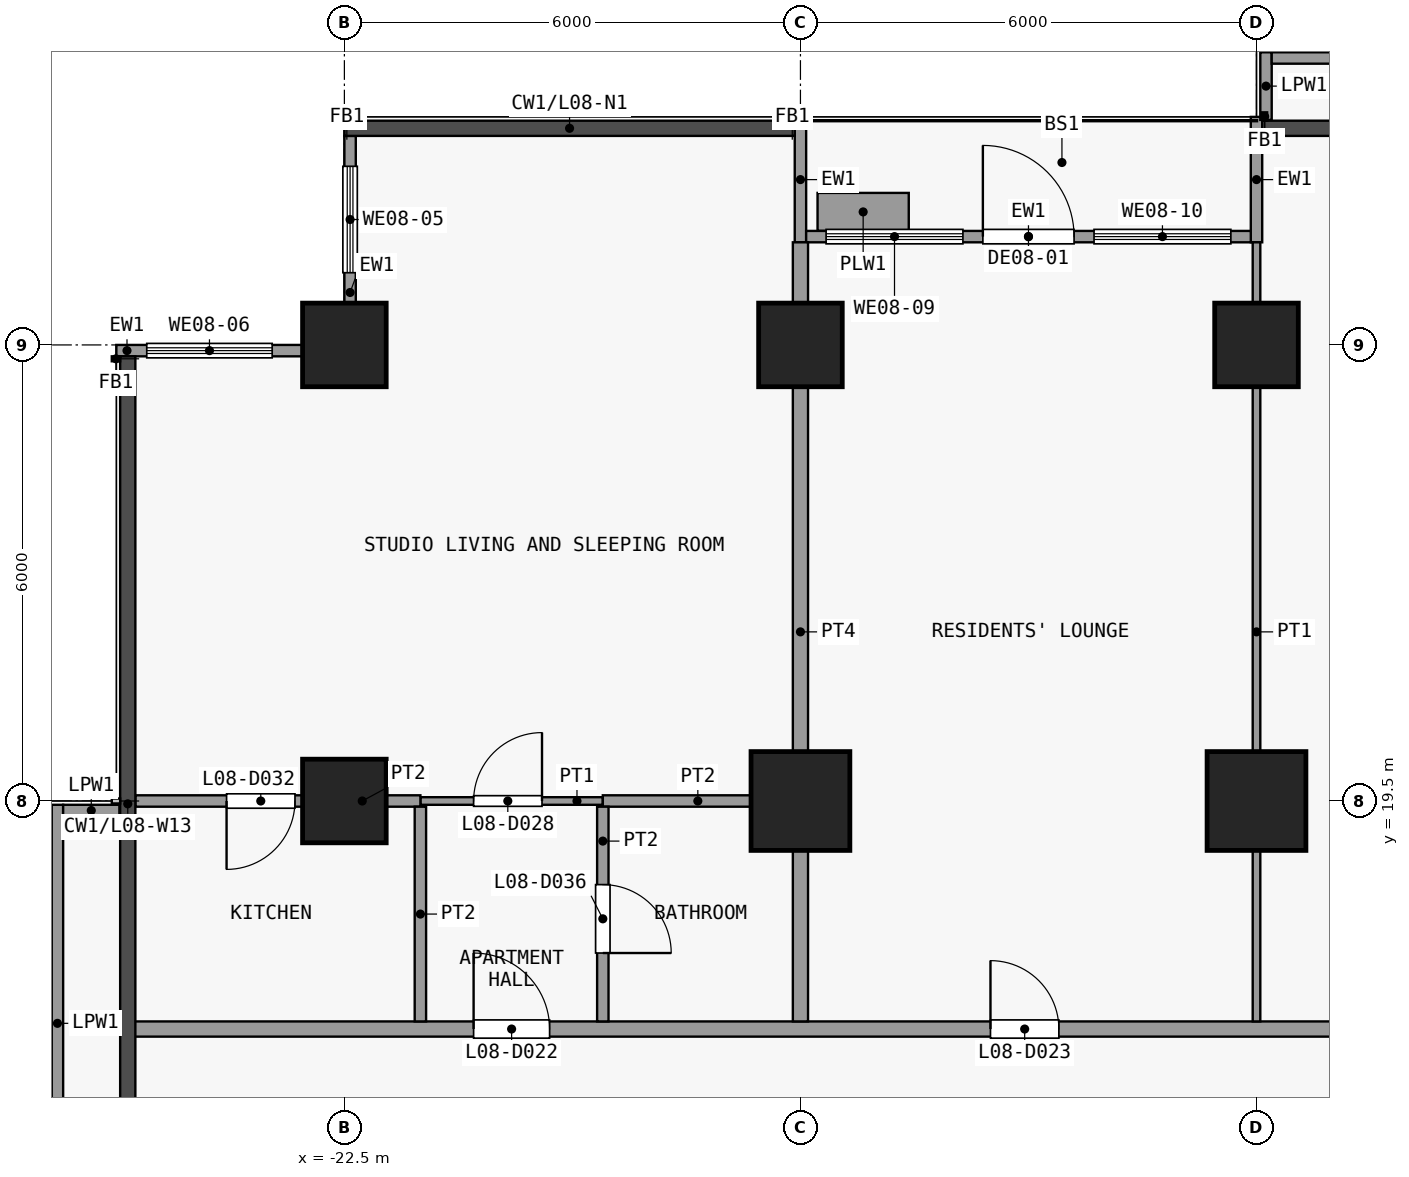
"""IFC4 building model, lengths in metres.
Left out: names, types, materials, properties, quantities, classifications, styles, units other than length and angle.
Written with IfcOpenShell. Run it as: python <this file> out.ifc"""

import sys

from ifc_helpers import new_model, si_unit, direction, frame, frame_2d, origin, origin_2d, place, context, subcontext, project, spatial, rectangle, extrude, element, fill, save


model = new_model("IFC4")
c1 = context("Model", 3, precision=1e-05, world=origin(), true_north=direction((0.0, 1.0)))
c2 = subcontext(c1, "Body", "Model", "MODEL_VIEW")
j1 = project(units=[si_unit("LENGTHUNIT", "METRE"), si_unit("PLANEANGLEUNIT", "RADIAN")], contexts=[c1])
p1 = place(None, origin())
s1 = spatial("IfcSite", under=j1, at=p1, CompositionType="ELEMENT")
p2 = place(p1, origin())
s2 = spatial("IfcBuilding", under=s1, at=p2, CompositionType="ELEMENT")
p3 = place(p2, frame((0.0, 0.0, 39.7)))
s3 = spatial("IfcBuildingStorey", under=s2, at=p3, CompositionType="ELEMENT", Elevation=39.7)
for number, where, z_axis, x_axis in (
    (1, (-22.5, 19.5, 0.0), (0.0, 0.0, 1.0), (1.0, 0.0, 0.0)),
    (2, (-22.5, 25.5, 0.0), (0.0, 0.0, 1.0), (1.0, 0.0, 0.0)),
):
    element("IfcColumn", number, at=place(p3, frame(where, z_axis=z_axis, x_axis=x_axis)), inside=s3, PredefinedType="COLUMN", context=c2, shape_type="SweptSolid", body=[
        extrude(rectangle(XDim=1.1, YDim=1.1, at=origin_2d()), origin(), (0.0, 0.0, 1.0), 3.6),
    ])
p4 = place(p3, frame((-16.5, 19.5, 0.0), z_axis=(0.0, 0.0, 1.0), x_axis=(1.0, 0.0, 0.0)))
e3 = element("IfcColumn", 3, at=p4, inside=s3, PredefinedType="COLUMN", context=c2, shape_type="SweptSolid", body=[
    extrude(rectangle(XDim=1.3, YDim=1.3, at=origin_2d()), origin(), (0.0, 0.0, 1.0), 3.6),
])
p5 = place(p3, frame((-16.5, 25.5, 0.0), z_axis=(0.0, 0.0, 1.0), x_axis=(1.0, 0.0, 0.0)))
e4 = element("IfcColumn", 4, at=p5, inside=s3, PredefinedType="COLUMN", context=c2, shape_type="SweptSolid", body=[
    extrude(rectangle(XDim=1.1, YDim=1.1, at=origin_2d()), origin(), (0.0, 0.0, 1.0), 3.6),
])
p6 = place(p3, frame((-10.5, 19.5, 0.0), z_axis=(0.0, 0.0, 1.0), x_axis=(1.0, 0.0, 0.0)))
e5 = element("IfcColumn", 5, at=p6, inside=s3, PredefinedType="COLUMN", context=c2, shape_type="SweptSolid", body=[
    extrude(rectangle(XDim=1.3, YDim=1.3, at=origin_2d()), origin(), (0.0, 0.0, 1.0), 3.6),
])
p7 = place(p3, frame((-10.5, 25.5, 0.0), z_axis=(0.0, 0.0, 1.0), x_axis=(1.0, 0.0, 0.0)))
e6 = element("IfcColumn", 6, at=p7, inside=s3, PredefinedType="COLUMN", context=c2, shape_type="SweptSolid", body=[
    extrude(rectangle(XDim=1.1, YDim=1.1, at=origin_2d()), origin(), (0.0, 0.0, 1.0), 3.6),
])
p8 = place(p3, frame((-22.425, 26.05, 0.0), z_axis=(0.0, 0.0, 1.0), x_axis=(0.0, 1.0, 0.0)))
e7 = element("IfcWall", 7, at=p8, inside=s3, PredefinedType="SOLIDWALL", context=c2, shape_type="SweptSolid", body=[
    extrude(rectangle(XDim=2.2, YDim=0.15, at=frame_2d((1.1, 0.0))), origin(), (0.0, 0.0, 1.0), 3.3),
])
p9 = place(p8, frame((0.4, 0.0, 0.9)))
e8 = element("IfcOpeningElement", 8, at=p9, cuts=e7, PredefinedType="OPENING", context=c2, shape_type="SweptSolid", body=[
    extrude(rectangle(XDim=1.4, YDim=2.4, at=frame_2d((0.7, 1.2))), frame((0.0, 0.085, 0.0), z_axis=(0.0, -1.0, 0.0), x_axis=(1.0, 0.0, 0.0)), (0.0, 0.0, 1.0), 0.17),
])
p10 = place(p3, frame((-25.5, 25.425, 0.0), z_axis=(0.0, 0.0, 1.0), x_axis=(1.0, 0.0, 0.0)))
e9 = element("IfcWall", 9, at=p10, inside=s3, PredefinedType="SOLIDWALL", context=c2, shape_type="SweptSolid", body=[
    extrude(rectangle(XDim=2.45, YDim=0.15, at=frame_2d((1.225, 0.0))), origin(), (0.0, 0.0, 1.0), 3.3),
])
p11 = place(p10, frame((0.4, 0.0, 0.9)))
e10 = element("IfcOpeningElement", 10, at=p11, cuts=e9, PredefinedType="OPENING", context=c2, shape_type="SweptSolid", body=[
    extrude(rectangle(XDim=1.65, YDim=2.4, at=frame_2d((0.825, 1.2))), frame((0.0, 0.085, 0.0), z_axis=(0.0, -1.0, 0.0), x_axis=(1.0, 0.0, 0.0)), (0.0, 0.0, 1.0), 0.17),
])
for number, where, z_axis, x_axis in (
    (11, (-16.5, 26.85, 0.0), (0.0, 0.0, 1.0), (0.0, 1.0, 0.0)),
    (12, (-10.5, 26.85, 0.0), (0.0, 0.0, 1.0), (0.0, 1.0, 0.0)),
):
    element("IfcWall", number, at=place(p3, frame(where, z_axis=z_axis, x_axis=x_axis)), inside=s3, PredefinedType="SOLIDWALL", context=c2, shape_type="SweptSolid", body=[
        extrude(rectangle(XDim=1.65, YDim=0.15, at=frame_2d((0.825, 0.0))), origin(), (0.0, 0.0, 1.0), 3.3),
    ])
p12 = place(p3, frame((-16.425, 26.925, 0.0), z_axis=(0.0, 0.0, 1.0), x_axis=(1.0, 0.0, 0.0)))
e13 = element("IfcWall", 13, at=p12, inside=s3, PredefinedType="SOLIDWALL", context=c2, shape_type="SweptSolid", body=[
    extrude(rectangle(XDim=5.85, YDim=0.15, at=frame_2d((2.925, 0.0))), origin(), (0.0, 0.0, 1.0), 3.3),
])
p13 = place(p12, frame((2.325, 0.0, 0.0)))
e14 = element("IfcOpeningElement", 14, at=p13, cuts=e13, PredefinedType="OPENING", context=c2, shape_type="SweptSolid", body=[
    extrude(rectangle(XDim=1.2, YDim=2.4, at=frame_2d((0.6, 1.2))), frame((0.0, 0.085, 0.0), z_axis=(0.0, -1.0, 0.0), x_axis=(1.0, 0.0, 0.0)), (0.0, 0.0, 1.0), 0.17),
])
p14 = place(p12, frame((0.262, 0.0, 0.9)))
e15 = element("IfcOpeningElement", 15, at=p14, cuts=e13, PredefinedType="OPENING", context=c2, shape_type="SweptSolid", body=[
    extrude(rectangle(XDim=1.8, YDim=2.1, at=frame_2d((0.9, 1.05))), frame((0.0, 0.085, 0.0), z_axis=(0.0, -1.0, 0.0), x_axis=(1.0, 0.0, 0.0)), (0.0, 0.0, 1.0), 0.17),
])
p15 = place(p12, frame((3.788, 0.0, 0.9)))
e16 = element("IfcOpeningElement", 16, at=p15, cuts=e13, PredefinedType="OPENING", context=c2, shape_type="SweptSolid", body=[
    extrude(rectangle(XDim=1.8, YDim=2.1, at=frame_2d((0.9, 1.05))), frame((0.0, 0.085, 0.0), z_axis=(0.0, -1.0, 0.0), x_axis=(1.0, 0.0, 0.0)), (0.0, 0.0, 1.0), 0.17),
])
p16 = place(p3, frame((-16.275, 27.25, 0.0), z_axis=(0.0, 0.0, 1.0), x_axis=(1.0, 0.0, 0.0)))
e17 = element("IfcWall", 17, at=p16, inside=s3, PredefinedType="USERDEFINED", context=c2, shape_type="SweptSolid", body=[
    extrude(rectangle(XDim=1.2, YDim=0.5, at=frame_2d((0.6, 0.0))), origin(), (0.0, 0.0, 1.0), 0.9),
])
p17 = place(p3, frame((-26.275, 13.7, 0.0), z_axis=(0.0, 0.0, 1.0), x_axis=(0.0, 1.0, 0.0)))
e18 = element("IfcWall", 18, at=p17, inside=s3, PredefinedType="PARAPET", context=c2, shape_type="SweptSolid", body=[
    extrude(rectangle(XDim=5.75, YDim=0.15, at=frame_2d((2.875, 0.0))), origin(), (0.0, 0.0, 1.0), 1.15),
])
p18 = place(p3, frame((-26.2, 19.375, 0.0), z_axis=(0.0, 0.0, 1.0), x_axis=(1.0, 0.0, 0.0)))
e19 = element("IfcWall", 19, at=p18, inside=s3, PredefinedType="PARAPET", context=c2, shape_type="SweptSolid", body=[
    extrude(rectangle(XDim=0.74, YDim=0.15, at=frame_2d((0.37, 0.0))), origin(), (0.0, 0.0, 1.0), 1.15),
])
p19 = place(p3, frame((-10.375, 28.46, 0.0), z_axis=(0.0, 0.0, 1.0), x_axis=(0.0, 1.0, 0.0)))
e20 = element("IfcWall", 20, at=p19, inside=s3, PredefinedType="PARAPET", context=c2, shape_type="SweptSolid", body=[
    extrude(rectangle(XDim=0.89, YDim=0.15, at=frame_2d((0.445, 0.0))), origin(), (0.0, 0.0, 1.0), 1.15),
])
p20 = place(p3, frame((-10.3, 29.275, 0.0), z_axis=(0.0, 0.0, 1.0), x_axis=(1.0, 0.0, 0.0)))
e21 = element("IfcWall", 21, at=p20, inside=s3, PredefinedType="PARAPET", context=c2, shape_type="SweptSolid", body=[
    extrude(rectangle(XDim=5.84, YDim=0.15, at=frame_2d((2.92, 0.0))), origin(), (0.0, 0.0, 1.0), 1.15),
])
p21 = place(p3, frame((-25.35, 16.5, 0.0), z_axis=(0.0, 0.0, 1.0), x_axis=(1.0, 0.0, 0.0)))
e22 = element("IfcWall", 22, at=p21, inside=s3, PredefinedType="PARTITIONING", context=c2, shape_type="SweptSolid", body=[
    extrude(rectangle(XDim=50.7, YDim=0.2, at=frame_2d((25.35, 0.0))), origin(), (0.0, 0.0, 1.0), 3.3),
])
p22 = place(p21, frame((4.55, 0.0, 0.0)))
e23 = element("IfcOpeningElement", 23, at=p22, cuts=e22, PredefinedType="OPENING", context=c2, shape_type="SweptSolid", body=[
    extrude(rectangle(XDim=1.0, YDim=2.1, at=frame_2d((0.5, 1.05))), frame((0.0, 0.11, 0.0), z_axis=(0.0, -1.0, 0.0), x_axis=(1.0, 0.0, 0.0)), (0.0, 0.0, 1.0), 0.22),
])
p23 = place(p21, frame((11.35, 0.0, 0.0)))
e24 = element("IfcOpeningElement", 24, at=p23, cuts=e22, PredefinedType="OPENING", context=c2, shape_type="SweptSolid", body=[
    extrude(rectangle(XDim=0.9, YDim=2.1, at=frame_2d((0.45, 1.05))), frame((0.0, 0.11, 0.0), z_axis=(0.0, -1.0, 0.0), x_axis=(1.0, 0.0, 0.0)), (0.0, 0.0, 1.0), 0.22),
])
p24 = place(p21, frame((17.35, 0.0, 0.0)))
e25 = element("IfcOpeningElement", 25, at=p24, cuts=e22, PredefinedType="OPENING", context=c2, shape_type="SweptSolid", body=[
    extrude(rectangle(XDim=0.9, YDim=2.1, at=frame_2d((0.45, 1.05))), frame((0.0, 0.11, 0.0), z_axis=(0.0, -1.0, 0.0), x_axis=(1.0, 0.0, 0.0)), (0.0, 0.0, 1.0), 0.22),
])
p25 = place(p21, frame((24.05, 0.0, 0.0)))
e26 = element("IfcOpeningElement", 26, at=p25, cuts=e22, PredefinedType="OPENING", context=c2, shape_type="SweptSolid", body=[
    extrude(rectangle(XDim=1.0, YDim=2.1, at=frame_2d((0.5, 1.05))), frame((0.0, 0.11, 0.0), z_axis=(0.0, -1.0, 0.0), x_axis=(1.0, 0.0, 0.0)), (0.0, 0.0, 1.0), 0.22),
])
p26 = place(p21, frame((30.55, 0.0, 0.0)))
e27 = element("IfcOpeningElement", 27, at=p26, cuts=e22, PredefinedType="OPENING", context=c2, shape_type="SweptSolid", body=[
    extrude(rectangle(XDim=1.0, YDim=2.1, at=frame_2d((0.5, 1.05))), frame((0.0, 0.11, 0.0), z_axis=(0.0, -1.0, 0.0), x_axis=(1.0, 0.0, 0.0)), (0.0, 0.0, 1.0), 0.22),
])
p27 = place(p21, frame((42.55, 0.0, 0.0)))
e28 = element("IfcOpeningElement", 28, at=p27, cuts=e22, PredefinedType="OPENING", context=c2, shape_type="SweptSolid", body=[
    extrude(rectangle(XDim=1.0, YDim=2.1, at=frame_2d((0.5, 1.05))), frame((0.0, 0.11, 0.0), z_axis=(0.0, -1.0, 0.0), x_axis=(1.0, 0.0, 0.0)), (0.0, 0.0, 1.0), 0.22),
])
p28 = place(p3, frame((-21.5, 19.5, 0.0), z_axis=(0.0, 0.0, 1.0), x_axis=(1.0, 0.0, 0.0)))
e29 = element("IfcWall", 29, at=p28, inside=s3, PredefinedType="PARTITIONING", context=c2, shape_type="SweptSolid", body=[
    extrude(rectangle(XDim=2.4, YDim=0.1, at=frame_2d((1.2, 0.0))), origin(), (0.0, 0.0, 1.0), 3.3),
])
p29 = place(p28, frame((0.7, 0.0, 0.0)))
e30 = element("IfcOpeningElement", 30, at=p29, cuts=e29, PredefinedType="OPENING", context=c2, shape_type="SweptSolid", body=[
    extrude(rectangle(XDim=0.9, YDim=2.1, at=frame_2d((0.45, 1.05))), frame((0.0, 0.06, 0.0), z_axis=(0.0, -1.0, 0.0), x_axis=(1.0, 0.0, 0.0)), (0.0, 0.0, 1.0), 0.12),
])
p30 = place(p3, frame((-25.25, 19.5, 0.0), z_axis=(0.0, 0.0, 1.0), x_axis=(1.0, 0.0, 0.0)))
e31 = element("IfcWall", 31, at=p30, inside=s3, PredefinedType="PARTITIONING", context=c2, shape_type="SweptSolid", body=[
    extrude(rectangle(XDim=3.75, YDim=0.15, at=frame_2d((1.875, 0.0))), origin(), (0.0, 0.0, 1.0), 3.3),
])
p31 = place(p30, frame((1.2, 0.0, 0.0)))
e32 = element("IfcOpeningElement", 32, at=p31, cuts=e31, PredefinedType="OPENING", context=c2, shape_type="SweptSolid", body=[
    extrude(rectangle(XDim=0.9, YDim=2.1, at=frame_2d((0.45, 1.05))), frame((0.0, 0.085, 0.0), z_axis=(0.0, -1.0, 0.0), x_axis=(1.0, 0.0, 0.0)), (0.0, 0.0, 1.0), 0.17),
])
p32 = place(p3, frame((-19.1, 19.5, 0.0), z_axis=(0.0, 0.0, 1.0), x_axis=(1.0, 0.0, 0.0)))
e33 = element("IfcWall", 33, at=p32, inside=s3, PredefinedType="PARTITIONING", context=c2, shape_type="SweptSolid", body=[
    extrude(rectangle(XDim=2.5, YDim=0.15, at=frame_2d((1.25, 0.0))), origin(), (0.0, 0.0, 1.0), 3.3),
])
p33 = place(p3, frame((-21.5, 16.6, 0.0), z_axis=(0.0, 0.0, 1.0), x_axis=(0.0, 1.0, 0.0)))
e34 = element("IfcWall", 34, at=p33, inside=s3, PredefinedType="PARTITIONING", context=c2, shape_type="SweptSolid", body=[
    extrude(rectangle(XDim=2.825, YDim=0.15, at=frame_2d((1.413, 0.0))), origin(), (0.0, 0.0, 1.0), 3.3),
])
p34 = place(p3, frame((-19.1, 16.6, 0.0), z_axis=(0.0, 0.0, 1.0), x_axis=(0.0, 1.0, 0.0)))
e35 = element("IfcWall", 35, at=p34, inside=s3, PredefinedType="PARTITIONING", context=c2, shape_type="SweptSolid", body=[
    extrude(rectangle(XDim=2.825, YDim=0.15, at=frame_2d((1.413, 0.0))), origin(), (0.0, 0.0, 1.0), 3.3),
])
p35 = place(p34, frame((0.9, 0.0, 0.0)))
e36 = element("IfcOpeningElement", 36, at=p35, cuts=e35, PredefinedType="OPENING", context=c2, shape_type="SweptSolid", body=[
    extrude(rectangle(XDim=0.9, YDim=2.1, at=frame_2d((0.45, 1.05))), frame((0.0, 0.085, 0.0), z_axis=(0.0, -1.0, 0.0), x_axis=(1.0, 0.0, 0.0)), (0.0, 0.0, 1.0), 0.17),
])
p36 = place(p3, frame((-16.5, 16.6, 0.0), z_axis=(0.0, 0.0, 1.0), x_axis=(0.0, 1.0, 0.0)))
e37 = element("IfcWall", 37, at=p36, inside=s3, PredefinedType="PARTITIONING", context=c2, shape_type="SweptSolid", body=[
    extrude(rectangle(XDim=10.25, YDim=0.2, at=frame_2d((5.125, 0.0))), origin(), (0.0, 0.0, 1.0), 3.3),
])
p37 = place(p3, frame((-10.5, 16.6, 0.0), z_axis=(0.0, 0.0, 1.0), x_axis=(0.0, 1.0, 0.0)))
e38 = element("IfcWall", 38, at=p37, inside=s3, PredefinedType="PARTITIONING", context=c2, shape_type="SweptSolid", body=[
    extrude(rectangle(XDim=10.25, YDim=0.1, at=frame_2d((5.125, 0.0))), origin(), (0.0, 0.0, 1.0), 3.3),
])
p38 = place(p9, origin())
e39 = element("IfcWindow", 39, at=p38, inside=s3, PartitioningType="SINGLE_PANEL", PredefinedType="WINDOW", context=c2, shape_type="SweptSolid", body=[
    extrude(rectangle(XDim=1.4, YDim=2.4, at=frame_2d((0.7, 1.2))), frame((0.0, 0.03, 0.0), z_axis=(0.0, -1.0, 0.0), x_axis=(1.0, 0.0, 0.0)), (0.0, 0.0, 1.0), 0.06),
])
fill(e8, e39)
p39 = place(p11, origin())
e40 = element("IfcWindow", 40, at=p39, inside=s3, PartitioningType="SINGLE_PANEL", PredefinedType="WINDOW", context=c2, shape_type="SweptSolid", body=[
    extrude(rectangle(XDim=1.65, YDim=2.4, at=frame_2d((0.825, 1.2))), frame((0.0, 0.03, 0.0), z_axis=(0.0, -1.0, 0.0), x_axis=(1.0, 0.0, 0.0)), (0.0, 0.0, 1.0), 0.06),
])
fill(e10, e40)
p40 = place(p13, origin())
e41 = element("IfcDoor", 41, at=p40, inside=s3, OperationType="SINGLE_SWING_LEFT", PredefinedType="DOOR", context=c2, shape_type="SweptSolid", body=[
    extrude(rectangle(XDim=1.2, YDim=2.4, at=frame_2d((0.6, 1.2))), frame((0.0, 0.025, 0.0), z_axis=(0.0, -1.0, 0.0), x_axis=(1.0, 0.0, 0.0)), (0.0, 0.0, 1.0), 0.05),
])
fill(e14, e41)
p41 = place(p14, origin())
e42 = element("IfcWindow", 42, at=p41, inside=s3, PartitioningType="SINGLE_PANEL", PredefinedType="WINDOW", context=c2, shape_type="SweptSolid", body=[
    extrude(rectangle(XDim=1.8, YDim=2.1, at=frame_2d((0.9, 1.05))), frame((0.0, 0.03, 0.0), z_axis=(0.0, -1.0, 0.0), x_axis=(1.0, 0.0, 0.0)), (0.0, 0.0, 1.0), 0.06),
])
fill(e15, e42)
p42 = place(p15, origin())
e43 = element("IfcWindow", 43, at=p42, inside=s3, PartitioningType="SINGLE_PANEL", PredefinedType="WINDOW", context=c2, shape_type="SweptSolid", body=[
    extrude(rectangle(XDim=1.8, YDim=2.1, at=frame_2d((0.9, 1.05))), frame((0.0, 0.03, 0.0), z_axis=(0.0, -1.0, 0.0), x_axis=(1.0, 0.0, 0.0)), (0.0, 0.0, 1.0), 0.06),
])
fill(e16, e43)
p43 = place(p22, origin())
e44 = element("IfcDoor", 44, at=p43, inside=s3, OperationType="SINGLE_SWING_RIGHT", PredefinedType="DOOR", context=c2, shape_type="SweptSolid", body=[
    extrude(rectangle(XDim=1.0, YDim=2.1, at=frame_2d((0.5, 1.05))), frame((0.0, 0.025, 0.0), z_axis=(0.0, -1.0, 0.0), x_axis=(1.0, 0.0, 0.0)), (0.0, 0.0, 1.0), 0.05),
])
fill(e23, e44)
p44 = place(p23, origin())
e45 = element("IfcDoor", 45, at=p44, inside=s3, OperationType="SINGLE_SWING_RIGHT", PredefinedType="DOOR", context=c2, shape_type="SweptSolid", body=[
    extrude(rectangle(XDim=0.9, YDim=2.1, at=frame_2d((0.45, 1.05))), frame((0.0, 0.025, 0.0), z_axis=(0.0, -1.0, 0.0), x_axis=(1.0, 0.0, 0.0)), (0.0, 0.0, 1.0), 0.05),
])
fill(e24, e45)
p45 = place(p29, origin())
e46 = element("IfcDoor", 46, at=p45, inside=s3, OperationType="SINGLE_SWING_LEFT", PredefinedType="DOOR", context=c2, shape_type="SweptSolid", body=[
    extrude(rectangle(XDim=0.9, YDim=2.1, at=frame_2d((0.45, 1.05))), frame((0.0, 0.025, 0.0), z_axis=(0.0, -1.0, 0.0), x_axis=(1.0, 0.0, 0.0)), (0.0, 0.0, 1.0), 0.05),
])
fill(e30, e46)
p46 = place(p31, origin())
e47 = element("IfcDoor", 47, at=p46, inside=s3, OperationType="SINGLE_SWING_LEFT", PredefinedType="DOOR", context=c2, shape_type="SweptSolid", body=[
    extrude(rectangle(XDim=0.9, YDim=2.1, at=frame_2d((0.45, 1.05))), frame((0.0, 0.025, 0.0), z_axis=(0.0, -1.0, 0.0), x_axis=(1.0, 0.0, 0.0)), (0.0, 0.0, 1.0), 0.05),
])
fill(e32, e47)
p47 = place(p35, origin())
e48 = element("IfcDoor", 48, at=p47, inside=s3, OperationType="SINGLE_SWING_LEFT", PredefinedType="DOOR", context=c2, shape_type="SweptSolid", body=[
    extrude(rectangle(XDim=0.9, YDim=2.1, at=frame_2d((0.45, 1.05))), frame((0.0, 0.025, 0.0), z_axis=(0.0, -1.0, 0.0), x_axis=(1.0, 0.0, 0.0)), (0.0, 0.0, 1.0), 0.05),
])
fill(e36, e48)
save(model, sys.argv[1])
